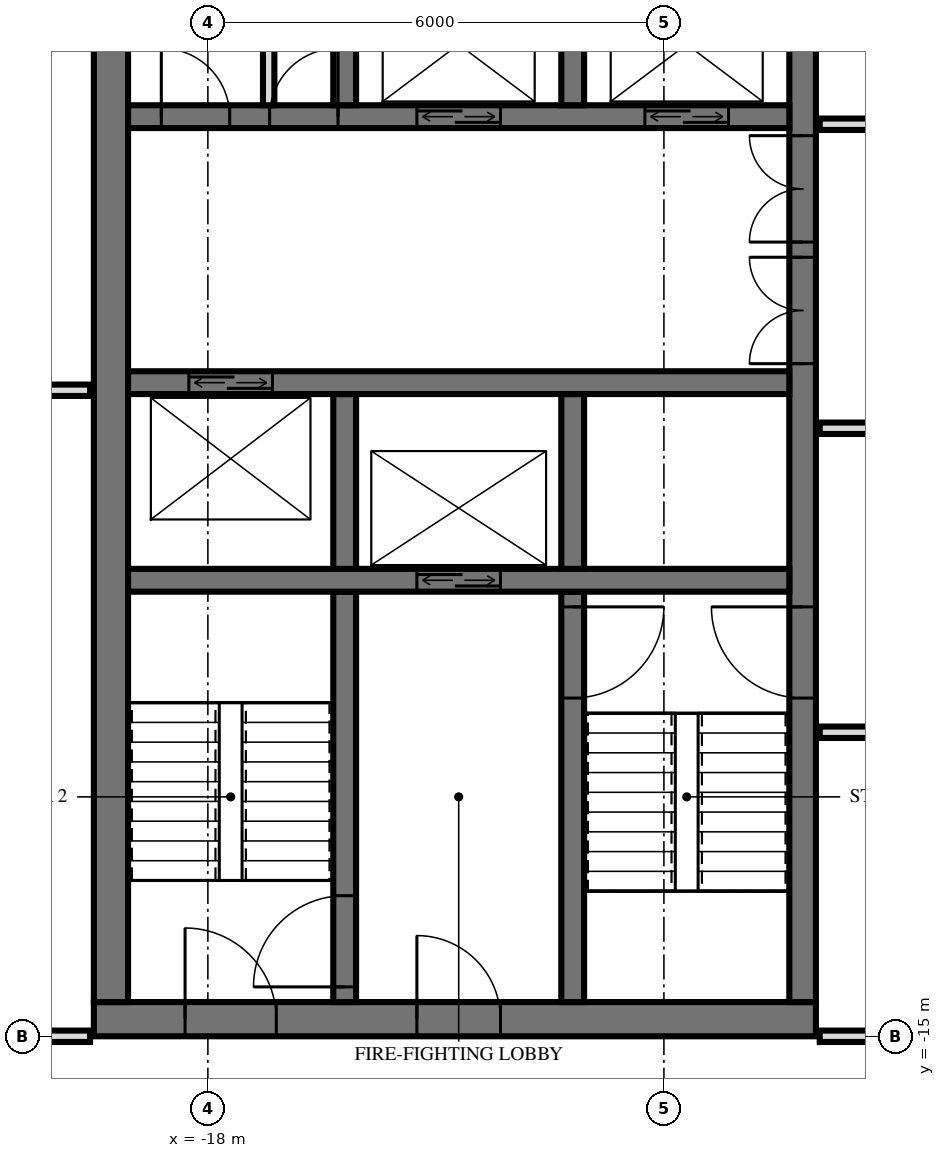
"""IFC4 building model, lengths in metres.
Left out: names, types, materials, properties, quantities, classifications, styles, units other than length and angle.
Written with IfcOpenShell. Run it as: python <this file> out.ifc"""

import sys

from ifc_helpers import new_model, si_unit, direction, frame, frame_2d, origin, place, context, subcontext, project, spatial, rectangle, extrude, element, fill, save


model = new_model("IFC4")
c1 = context("Model", 3, precision=1e-05, world=origin(), true_north=direction((0.0, 1.0)))
c2 = subcontext(c1, "Body", "Model", "MODEL_VIEW")
j1 = project(units=[si_unit("LENGTHUNIT", "METRE"), si_unit("PLANEANGLEUNIT", "RADIAN")], contexts=[c1])
p1 = place(None, origin())
s1 = spatial("IfcSite", under=j1, at=p1, CompositionType="ELEMENT")
p2 = place(p1, origin())
s2 = spatial("IfcBuilding", under=s1, at=p2, CompositionType="ELEMENT")
p3 = place(p2, frame((0.0, 0.0, 294.6)))
s3 = spatial("IfcBuildingStorey", under=s2, at=p3, CompositionType="ELEMENT", Elevation=294.6)
p4 = place(p3, frame((-19.5, -14.775, 0.0), z_axis=(0.0, 0.0, 1.0), x_axis=(1.0, 0.0, 0.0)))
e1 = element("IfcWall", 1, at=p4, inside=s3, PredefinedType="SHEAR", context=c2, shape_type="SweptSolid", body=[
    extrude(rectangle(XDim=9.5, YDim=0.45, at=frame_2d((4.75, 0.0))), origin(), (0.0, 0.0, 1.0), 3.5),
])
p5 = place(p4, frame((1.2, 0.0, 0.0)))
e2 = element("IfcOpeningElement", 2, at=p5, cuts=e1, PredefinedType="OPENING", context=c2, shape_type="SweptSolid", body=[
    extrude(rectangle(XDim=1.2, YDim=2.1, at=frame_2d((0.6, 1.05))), frame((0.0, 0.235, 0.0), z_axis=(0.0, -1.0, 0.0), x_axis=(1.0, 0.0, 0.0)), (0.0, 0.0, 1.0), 0.47),
])
p6 = place(p4, frame((4.25, 0.0, 0.0)))
e3 = element("IfcOpeningElement", 3, at=p6, cuts=e1, PredefinedType="OPENING", context=c2, shape_type="SweptSolid", body=[
    extrude(rectangle(XDim=1.1, YDim=2.1, at=frame_2d((0.55, 1.05))), frame((0.0, 0.235, 0.0), z_axis=(0.0, -1.0, 0.0), x_axis=(1.0, 0.0, 0.0)), (0.0, 0.0, 1.0), 0.47),
])
p7 = place(p3, frame((-10.175, -14.55, 0.0), z_axis=(0.0, 0.0, 1.0), x_axis=(0.0, 1.0, 0.0)))
e4 = element("IfcWall", 4, at=p7, inside=s3, PredefinedType="SHEAR", context=c2, shape_type="SweptSolid", body=[
    extrude(rectangle(XDim=14.1, YDim=0.35, at=frame_2d((7.05, 0.0))), origin(), (0.0, 0.0, 1.0), 3.5),
])
p8 = place(p7, frame((8.4, 0.0, 0.0)))
e5 = element("IfcOpeningElement", 5, at=p8, cuts=e4, PredefinedType="OPENING", context=c2, shape_type="SweptSolid", body=[
    extrude(rectangle(XDim=1.4, YDim=2.4, at=frame_2d((0.7, 1.2))), frame((0.0, 0.185, 0.0), z_axis=(0.0, -1.0, 0.0), x_axis=(1.0, 0.0, 0.0)), (0.0, 0.0, 1.0), 0.37),
])
p9 = place(p7, frame((10.0, 0.0, 0.0)))
e6 = element("IfcOpeningElement", 6, at=p9, cuts=e4, PredefinedType="OPENING", context=c2, shape_type="SweptSolid", body=[
    extrude(rectangle(XDim=1.4, YDim=2.4, at=frame_2d((0.7, 1.2))), frame((0.0, 0.185, 0.0), z_axis=(0.0, -1.0, 0.0), x_axis=(1.0, 0.0, 0.0)), (0.0, 0.0, 1.0), 0.37),
])
p10 = place(p7, frame((4.0, 0.0, 0.0)))
e7 = element("IfcOpeningElement", 7, at=p10, cuts=e4, PredefinedType="OPENING", context=c2, shape_type="SweptSolid", body=[
    extrude(rectangle(XDim=1.2, YDim=2.1, at=frame_2d((0.6, 1.05))), frame((0.0, 0.185, 0.0), z_axis=(0.0, -1.0, 0.0), x_axis=(1.0, 0.0, 0.0)), (0.0, 0.0, 1.0), 0.37),
])
p11 = place(p3, frame((-19.275, -14.55, 0.0), z_axis=(0.0, 0.0, 1.0), x_axis=(0.0, 1.0, 0.0)))
e8 = element("IfcWall", 8, at=p11, inside=s3, PredefinedType="SHEAR", context=c2, shape_type="SweptSolid", body=[
    extrude(rectangle(XDim=14.1, YDim=0.45, at=frame_2d((7.05, 0.0))), origin(), (0.0, 0.0, 1.0), 3.5),
])
p12 = place(p3, frame((-19.05, -2.9, 0.0), z_axis=(0.0, 0.0, 1.0), x_axis=(1.0, 0.0, 0.0)))
e9 = element("IfcWall", 9, at=p12, inside=s3, PredefinedType="SHEAR", context=c2, shape_type="SweptSolid", body=[
    extrude(rectangle(XDim=8.7, YDim=0.3, at=frame_2d((4.35, 0.0))), origin(), (0.0, 0.0, 1.0), 3.5),
])
p13 = place(p12, frame((6.8, 0.0, 0.0)))
e10 = element("IfcOpeningElement", 10, at=p13, cuts=e9, PredefinedType="OPENING", context=c2, shape_type="SweptSolid", body=[
    extrude(rectangle(XDim=1.1, YDim=2.1, at=frame_2d((0.55, 1.05))), frame((0.0, 0.16, 0.0), z_axis=(0.0, -1.0, 0.0), x_axis=(1.0, 0.0, 0.0)), (0.0, 0.0, 1.0), 0.32),
])
p14 = place(p12, frame((3.8, 0.0, 0.0)))
e11 = element("IfcOpeningElement", 11, at=p14, cuts=e9, PredefinedType="OPENING", context=c2, shape_type="SweptSolid", body=[
    extrude(rectangle(XDim=1.1, YDim=2.1, at=frame_2d((0.55, 1.05))), frame((0.0, 0.16, 0.0), z_axis=(0.0, -1.0, 0.0), x_axis=(1.0, 0.0, 0.0)), (0.0, 0.0, 1.0), 0.32),
])
p15 = place(p12, frame((1.863, 0.0, 0.0)))
e12 = element("IfcOpeningElement", 12, at=p15, cuts=e9, PredefinedType="OPENING", context=c2, shape_type="SweptSolid", body=[
    extrude(rectangle(XDim=0.9, YDim=2.1, at=frame_2d((0.45, 1.05))), frame((0.0, 0.16, 0.0), z_axis=(0.0, -1.0, 0.0), x_axis=(1.0, 0.0, 0.0)), (0.0, 0.0, 1.0), 0.32),
])
p16 = place(p12, frame((0.438, 0.0, 0.0)))
e13 = element("IfcOpeningElement", 13, at=p16, cuts=e9, PredefinedType="OPENING", context=c2, shape_type="SweptSolid", body=[
    extrude(rectangle(XDim=0.9, YDim=2.1, at=frame_2d((0.45, 1.05))), frame((0.0, 0.16, 0.0), z_axis=(0.0, -1.0, 0.0), x_axis=(1.0, 0.0, 0.0)), (0.0, 0.0, 1.0), 0.32),
])
p17 = place(p3, frame((-19.05, -6.4, 0.0), z_axis=(0.0, 0.0, 1.0), x_axis=(1.0, 0.0, 0.0)))
e14 = element("IfcWall", 14, at=p17, inside=s3, PredefinedType="SHEAR", context=c2, shape_type="SweptSolid", body=[
    extrude(rectangle(XDim=8.7, YDim=0.3, at=frame_2d((4.35, 0.0))), origin(), (0.0, 0.0, 1.0), 3.5),
])
p18 = place(p17, frame((0.8, 0.0, 0.0)))
e15 = element("IfcOpeningElement", 15, at=p18, cuts=e14, PredefinedType="OPENING", context=c2, shape_type="SweptSolid", body=[
    extrude(rectangle(XDim=1.1, YDim=2.1, at=frame_2d((0.55, 1.05))), frame((0.0, 0.16, 0.0), z_axis=(0.0, -1.0, 0.0), x_axis=(1.0, 0.0, 0.0)), (0.0, 0.0, 1.0), 0.32),
])
p19 = place(p3, frame((-19.05, -9.0, 0.0), z_axis=(0.0, 0.0, 1.0), x_axis=(1.0, 0.0, 0.0)))
e16 = element("IfcWall", 16, at=p19, inside=s3, PredefinedType="SHEAR", context=c2, shape_type="SweptSolid", body=[
    extrude(rectangle(XDim=8.7, YDim=0.3, at=frame_2d((4.35, 0.0))), origin(), (0.0, 0.0, 1.0), 3.5),
])
p20 = place(p19, frame((3.8, 0.0, 0.0)))
e17 = element("IfcOpeningElement", 17, at=p20, cuts=e16, PredefinedType="OPENING", context=c2, shape_type="SweptSolid", body=[
    extrude(rectangle(XDim=1.1, YDim=2.1, at=frame_2d((0.55, 1.05))), frame((0.0, 0.16, 0.0), z_axis=(0.0, -1.0, 0.0), x_axis=(1.0, 0.0, 0.0)), (0.0, 0.0, 1.0), 0.32),
])
for number, where, z_axis, x_axis in (
    (18, (-13.2, -2.75, 0.0), (0.0, 0.0, 1.0), (0.0, 1.0, 0.0)),
    (19, (-13.2, -8.85, 0.0), (0.0, 0.0, 1.0), (0.0, 1.0, 0.0)),
):
    element("IfcWall", number, at=place(p3, frame(where, z_axis=z_axis, x_axis=x_axis)), inside=s3, PredefinedType="SHEAR", context=c2, shape_type="SweptSolid", body=[
        extrude(rectangle(XDim=2.3, YDim=0.3, at=frame_2d((1.15, 0.0))), origin(), (0.0, 0.0, 1.0), 3.5),
    ])
p21 = place(p3, frame((-13.2, -14.55, 0.0), z_axis=(0.0, 0.0, 1.0), x_axis=(0.0, 1.0, 0.0)))
e20 = element("IfcWall", 20, at=p21, inside=s3, PredefinedType="SHEAR", context=c2, shape_type="SweptSolid", body=[
    extrude(rectangle(XDim=5.4, YDim=0.3, at=frame_2d((2.7, 0.0))), origin(), (0.0, 0.0, 1.0), 3.5),
])
p22 = place(p21, frame((4.0, 0.0, 0.0)))
e21 = element("IfcOpeningElement", 21, at=p22, cuts=e20, PredefinedType="OPENING", context=c2, shape_type="SweptSolid", body=[
    extrude(rectangle(XDim=1.2, YDim=2.1, at=frame_2d((0.6, 1.05))), frame((0.0, 0.16, 0.0), z_axis=(0.0, -1.0, 0.0), x_axis=(1.0, 0.0, 0.0)), (0.0, 0.0, 1.0), 0.32),
])
for number, where, z_axis, x_axis in (
    (22, (-16.2, -2.75, 0.0), (0.0, 0.0, 1.0), (0.0, 1.0, 0.0)),
    (23, (-16.2, -8.85, 0.0), (0.0, 0.0, 1.0), (0.0, 1.0, 0.0)),
):
    element("IfcWall", number, at=place(p3, frame(where, z_axis=z_axis, x_axis=x_axis)), inside=s3, PredefinedType="SHEAR", context=c2, shape_type="SweptSolid", body=[
        extrude(rectangle(XDim=2.3, YDim=0.3, at=frame_2d((1.15, 0.0))), origin(), (0.0, 0.0, 1.0), 3.5),
    ])
p23 = place(p3, frame((-16.2, -14.55, 0.0), z_axis=(0.0, 0.0, 1.0), x_axis=(0.0, 1.0, 0.0)))
e24 = element("IfcWall", 24, at=p23, inside=s3, PredefinedType="SHEAR", context=c2, shape_type="SweptSolid", body=[
    extrude(rectangle(XDim=5.4, YDim=0.3, at=frame_2d((2.7, 0.0))), origin(), (0.0, 0.0, 1.0), 3.5),
])
p24 = place(p23, frame((0.2, 0.0, 0.0)))
e25 = element("IfcOpeningElement", 25, at=p24, cuts=e24, PredefinedType="OPENING", context=c2, shape_type="SweptSolid", body=[
    extrude(rectangle(XDim=1.2, YDim=2.1, at=frame_2d((0.6, 1.05))), frame((0.0, 0.16, 0.0), z_axis=(0.0, -1.0, 0.0), x_axis=(1.0, 0.0, 0.0)), (0.0, 0.0, 1.0), 0.32),
])
p25 = place(p3, frame((-17.2, -2.75, 0.0), z_axis=(0.0, 0.0, 1.0), x_axis=(0.0, 1.0, 0.0)))
e26 = element("IfcWall", 26, at=p25, inside=s3, PredefinedType="PARTITIONING", context=c2, shape_type="SweptSolid", body=[
    extrude(rectangle(XDim=2.3, YDim=0.15, at=frame_2d((1.15, 0.0))), origin(), (0.0, 0.0, 1.0), 3.2),
])
p26 = place(p3, frame((-22.92, -15.0, 0.0), z_axis=(0.0, 0.0, 1.0), x_axis=(1.0, 0.0, 0.0)))
e27 = element("IfcWall", 27, at=p26, inside=s3, PredefinedType="PARTITIONING", context=c2, shape_type="SweptSolid", body=[
    extrude(rectangle(XDim=3.37, YDim=0.15, at=frame_2d((1.685, 0.0))), origin(), (0.0, 0.0, 1.0), 3.22),
])
p27 = place(p26, frame((1.47, 0.0, 0.0)))
e28 = element("IfcOpeningElement", 28, at=p27, cuts=e27, PredefinedType="OPENING", context=c2, shape_type="SweptSolid", body=[
    extrude(rectangle(XDim=1.0, YDim=2.1, at=frame_2d((0.5, 1.05))), frame((0.0, 0.085, 0.0), z_axis=(0.0, -1.0, 0.0), x_axis=(1.0, 0.0, 0.0)), (0.0, 0.0, 1.0), 0.17),
])
p28 = place(p3, frame((-9.95, -15.0, 0.0), z_axis=(0.0, 0.0, 1.0), x_axis=(1.0, 0.0, 0.0)))
e29 = element("IfcWall", 29, at=p28, inside=s3, PredefinedType="PARTITIONING", context=c2, shape_type="SweptSolid", body=[
    extrude(rectangle(XDim=19.9, YDim=0.15, at=frame_2d((9.95, 0.0))), origin(), (0.0, 0.0, 1.0), 2.584),
])
p29 = place(p28, frame((9.45, 0.0, 0.0)))
e30 = element("IfcOpeningElement", 30, at=p29, cuts=e29, PredefinedType="OPENING", context=c2, shape_type="SweptSolid", body=[
    extrude(rectangle(XDim=1.0, YDim=2.1, at=frame_2d((0.5, 1.05))), frame((0.0, 0.085, 0.0), z_axis=(0.0, -1.0, 0.0), x_axis=(1.0, 0.0, 0.0)), (0.0, 0.0, 1.0), 0.17),
])
p30 = place(p3, frame((-9.95, -11.0, 0.0), z_axis=(0.0, 0.0, 1.0), x_axis=(1.0, 0.0, 0.0)))
e31 = element("IfcWall", 31, at=p30, inside=s3, PredefinedType="PARTITIONING", context=c2, shape_type="SweptSolid", body=[
    extrude(rectangle(XDim=19.9, YDim=0.15, at=frame_2d((9.95, 0.0))), origin(), (0.0, 0.0, 1.0), 3.22),
])
p31 = place(p30, frame((9.45, 0.0, 0.0)))
e32 = element("IfcOpeningElement", 32, at=p31, cuts=e31, PredefinedType="OPENING", context=c2, shape_type="SweptSolid", body=[
    extrude(rectangle(XDim=1.0, YDim=2.1, at=frame_2d((0.5, 1.05))), frame((0.0, 0.085, 0.0), z_axis=(0.0, -1.0, 0.0), x_axis=(1.0, 0.0, 0.0)), (0.0, 0.0, 1.0), 0.17),
])
p32 = place(p30, frame((15.45, 0.0, 0.0)))
e33 = element("IfcOpeningElement", 33, at=p32, cuts=e31, PredefinedType="OPENING", context=c2, shape_type="SweptSolid", body=[
    extrude(rectangle(XDim=1.0, YDim=2.1, at=frame_2d((0.5, 1.05))), frame((0.0, 0.085, 0.0), z_axis=(0.0, -1.0, 0.0), x_axis=(1.0, 0.0, 0.0)), (0.0, 0.0, 1.0), 0.17),
])
p33 = place(p3, frame((-9.95, -7.0, 0.0), z_axis=(0.0, 0.0, 1.0), x_axis=(1.0, 0.0, 0.0)))
e34 = element("IfcWall", 34, at=p33, inside=s3, PredefinedType="PARTITIONING", context=c2, shape_type="SweptSolid", body=[
    extrude(rectangle(XDim=19.9, YDim=0.15, at=frame_2d((9.95, 0.0))), origin(), (0.0, 0.0, 1.0), 3.22),
])
p34 = place(p33, frame((9.45, 0.0, 0.0)))
e35 = element("IfcOpeningElement", 35, at=p34, cuts=e34, PredefinedType="OPENING", context=c2, shape_type="SweptSolid", body=[
    extrude(rectangle(XDim=1.0, YDim=2.1, at=frame_2d((0.5, 1.05))), frame((0.0, 0.085, 0.0), z_axis=(0.0, -1.0, 0.0), x_axis=(1.0, 0.0, 0.0)), (0.0, 0.0, 1.0), 0.17),
])
p35 = place(p33, frame((3.45, 0.0, 0.0)))
e36 = element("IfcOpeningElement", 36, at=p35, cuts=e34, PredefinedType="OPENING", context=c2, shape_type="SweptSolid", body=[
    extrude(rectangle(XDim=1.0, YDim=2.1, at=frame_2d((0.5, 1.05))), frame((0.0, 0.085, 0.0), z_axis=(0.0, -1.0, 0.0), x_axis=(1.0, 0.0, 0.0)), (0.0, 0.0, 1.0), 0.17),
])
p36 = place(p3, frame((-22.92, -6.5, 0.0), z_axis=(0.0, 0.0, 1.0), x_axis=(1.0, 0.0, 0.0)))
e37 = element("IfcWall", 37, at=p36, inside=s3, PredefinedType="PARTITIONING", context=c2, shape_type="SweptSolid", body=[
    extrude(rectangle(XDim=3.37, YDim=0.15, at=frame_2d((1.685, 0.0))), origin(), (0.0, 0.0, 1.0), 3.22),
])
p37 = place(p36, frame((1.17, 0.0, 0.0)))
e38 = element("IfcOpeningElement", 38, at=p37, cuts=e37, PredefinedType="OPENING", context=c2, shape_type="SweptSolid", body=[
    extrude(rectangle(XDim=0.9, YDim=2.1, at=frame_2d((0.45, 1.05))), frame((0.0, 0.085, 0.0), z_axis=(0.0, -1.0, 0.0), x_axis=(1.0, 0.0, 0.0)), (0.0, 0.0, 1.0), 0.17),
])
p38 = place(p3, frame((-9.95, -3.0, 0.0), z_axis=(0.0, 0.0, 1.0), x_axis=(1.0, 0.0, 0.0)))
e39 = element("IfcWall", 39, at=p38, inside=s3, PredefinedType="PARTITIONING", context=c2, shape_type="SweptSolid", body=[
    extrude(rectangle(XDim=19.9, YDim=0.15, at=frame_2d((9.95, 0.0))), origin(), (0.0, 0.0, 1.0), 3.22),
])
p39 = place(p38, frame((1.45, 0.0, 0.0)))
e40 = element("IfcOpeningElement", 40, at=p39, cuts=e39, PredefinedType="OPENING", context=c2, shape_type="SweptSolid", body=[
    extrude(rectangle(XDim=1.0, YDim=2.1, at=frame_2d((0.5, 1.05))), frame((0.0, 0.085, 0.0), z_axis=(0.0, -1.0, 0.0), x_axis=(1.0, 0.0, 0.0)), (0.0, 0.0, 1.0), 0.17),
])
p40 = place(p38, frame((4.95, 0.0, 0.0)))
e41 = element("IfcOpeningElement", 41, at=p40, cuts=e39, PredefinedType="OPENING", context=c2, shape_type="SweptSolid", body=[
    extrude(rectangle(XDim=1.0, YDim=2.1, at=frame_2d((0.5, 1.05))), frame((0.0, 0.085, 0.0), z_axis=(0.0, -1.0, 0.0), x_axis=(1.0, 0.0, 0.0)), (0.0, 0.0, 1.0), 0.17),
])
p41 = place(p38, frame((7.7, 0.0, 0.0)))
e42 = element("IfcOpeningElement", 42, at=p41, cuts=e39, PredefinedType="OPENING", context=c2, shape_type="SweptSolid", body=[
    extrude(rectangle(XDim=1.0, YDim=2.1, at=frame_2d((0.5, 1.05))), frame((0.0, 0.085, 0.0), z_axis=(0.0, -1.0, 0.0), x_axis=(1.0, 0.0, 0.0)), (0.0, 0.0, 1.0), 0.17),
])
p42 = place(p38, frame((14.2, 0.0, 0.0)))
e43 = element("IfcOpeningElement", 43, at=p42, cuts=e39, PredefinedType="OPENING", context=c2, shape_type="SweptSolid", body=[
    extrude(rectangle(XDim=1.0, YDim=2.1, at=frame_2d((0.5, 1.05))), frame((0.0, 0.085, 0.0), z_axis=(0.0, -1.0, 0.0), x_axis=(1.0, 0.0, 0.0)), (0.0, 0.0, 1.0), 0.17),
])
p43 = place(p13, origin())
e44 = element("IfcDoor", 44, at=p43, inside=s3, OperationType="DOUBLE_DOOR_SLIDING", PredefinedType="USERDEFINED", context=c2, shape_type="SweptSolid", body=[
    extrude(rectangle(XDim=1.1, YDim=2.1, at=frame_2d((0.55, 1.05))), frame((0.0, 0.025, 0.0), z_axis=(0.0, -1.0, 0.0), x_axis=(1.0, 0.0, 0.0)), (0.0, 0.0, 1.0), 0.05),
])
fill(e10, e44)
p44 = place(p14, origin())
e45 = element("IfcDoor", 45, at=p44, inside=s3, OperationType="DOUBLE_DOOR_SLIDING", PredefinedType="USERDEFINED", context=c2, shape_type="SweptSolid", body=[
    extrude(rectangle(XDim=1.1, YDim=2.1, at=frame_2d((0.55, 1.05))), frame((0.0, 0.025, 0.0), z_axis=(0.0, -1.0, 0.0), x_axis=(1.0, 0.0, 0.0)), (0.0, 0.0, 1.0), 0.05),
])
fill(e11, e45)
p45 = place(p20, origin())
e46 = element("IfcDoor", 46, at=p45, inside=s3, OperationType="DOUBLE_DOOR_SLIDING", PredefinedType="USERDEFINED", context=c2, shape_type="SweptSolid", body=[
    extrude(rectangle(XDim=1.1, YDim=2.1, at=frame_2d((0.55, 1.05))), frame((0.0, 0.025, 0.0), z_axis=(0.0, -1.0, 0.0), x_axis=(1.0, 0.0, 0.0)), (0.0, 0.0, 1.0), 0.05),
])
fill(e17, e46)
p46 = place(p18, origin())
e47 = element("IfcDoor", 47, at=p46, inside=s3, OperationType="DOUBLE_DOOR_SLIDING", PredefinedType="USERDEFINED", context=c2, shape_type="SweptSolid", body=[
    extrude(rectangle(XDim=1.1, YDim=2.1, at=frame_2d((0.55, 1.05))), frame((0.0, 0.025, 0.0), z_axis=(0.0, -1.0, 0.0), x_axis=(1.0, 0.0, 0.0)), (0.0, 0.0, 1.0), 0.05),
])
fill(e15, e47)
p47 = place(p8, origin())
e48 = element("IfcDoor", 48, at=p47, inside=s3, OperationType="DOUBLE_DOOR_SINGLE_SWING", PredefinedType="DOOR", context=c2, shape_type="SweptSolid", body=[
    extrude(rectangle(XDim=1.4, YDim=2.4, at=frame_2d((0.7, 1.2))), frame((0.0, 0.025, 0.0), z_axis=(0.0, -1.0, 0.0), x_axis=(1.0, 0.0, 0.0)), (0.0, 0.0, 1.0), 0.05),
])
fill(e5, e48)
p48 = place(p9, origin())
e49 = element("IfcDoor", 49, at=p48, inside=s3, OperationType="DOUBLE_DOOR_SINGLE_SWING", PredefinedType="DOOR", context=c2, shape_type="SweptSolid", body=[
    extrude(rectangle(XDim=1.4, YDim=2.4, at=frame_2d((0.7, 1.2))), frame((0.0, 0.025, 0.0), z_axis=(0.0, -1.0, 0.0), x_axis=(1.0, 0.0, 0.0)), (0.0, 0.0, 1.0), 0.05),
])
fill(e6, e49)
p49 = place(p10, origin())
e50 = element("IfcDoor", 50, at=p49, inside=s3, OperationType="SINGLE_SWING_LEFT", PredefinedType="DOOR", context=c2, shape_type="SweptSolid", body=[
    extrude(rectangle(XDim=1.2, YDim=2.1, at=frame_2d((0.6, 1.05))), frame((0.0, 0.025, 0.0), z_axis=(0.0, -1.0, 0.0), x_axis=(1.0, 0.0, 0.0)), (0.0, 0.0, 1.0), 0.05),
])
fill(e7, e50)
p50 = place(p5, origin())
e51 = element("IfcDoor", 51, at=p50, inside=s3, OperationType="SINGLE_SWING_RIGHT", PredefinedType="DOOR", context=c2, shape_type="SweptSolid", body=[
    extrude(rectangle(XDim=1.2, YDim=2.1, at=frame_2d((0.6, 1.05))), frame((0.0, 0.025, 0.0), z_axis=(0.0, -1.0, 0.0), x_axis=(1.0, 0.0, 0.0)), (0.0, 0.0, 1.0), 0.05),
])
fill(e2, e51)
p51 = place(p6, origin())
e52 = element("IfcDoor", 52, at=p51, inside=s3, OperationType="SINGLE_SWING_RIGHT", PredefinedType="DOOR", context=c2, shape_type="SweptSolid", body=[
    extrude(rectangle(XDim=1.1, YDim=2.1, at=frame_2d((0.55, 1.05))), frame((0.0, 0.025, 0.0), z_axis=(0.0, -1.0, 0.0), x_axis=(1.0, 0.0, 0.0)), (0.0, 0.0, 1.0), 0.05),
])
fill(e3, e52)
p52 = place(p15, origin())
e53 = element("IfcDoor", 53, at=p52, inside=s3, OperationType="SINGLE_SWING_LEFT", PredefinedType="DOOR", context=c2, shape_type="SweptSolid", body=[
    extrude(rectangle(XDim=0.9, YDim=2.1, at=frame_2d((0.45, 1.05))), frame((0.0, 0.025, 0.0), z_axis=(0.0, -1.0, 0.0), x_axis=(1.0, 0.0, 0.0)), (0.0, 0.0, 1.0), 0.05),
])
fill(e12, e53)
p53 = place(p16, origin())
e54 = element("IfcDoor", 54, at=p53, inside=s3, OperationType="SINGLE_SWING_RIGHT", PredefinedType="DOOR", context=c2, shape_type="SweptSolid", body=[
    extrude(rectangle(XDim=0.9, YDim=2.1, at=frame_2d((0.45, 1.05))), frame((0.0, 0.025, 0.0), z_axis=(0.0, -1.0, 0.0), x_axis=(1.0, 0.0, 0.0)), (0.0, 0.0, 1.0), 0.05),
])
fill(e13, e54)
p54 = place(p22, frame((0.6, 0.0, 0.0), z_axis=(0.0, 0.0, 1.0), x_axis=(-1.0, 0.0, 0.0)))
e55 = element("IfcDoor", 55, at=p54, inside=s3, OperationType="SINGLE_SWING_RIGHT", PredefinedType="DOOR", context=c2, shape_type="SweptSolid", body=[
    extrude(rectangle(XDim=1.2, YDim=2.1, at=frame_2d((0.0, 1.05))), frame((0.0, -0.025, 0.0), z_axis=(0.0, 1.0, 0.0), x_axis=(-1.0, 0.0, 0.0)), (0.0, 0.0, 1.0), 0.05),
])
fill(e21, e55)
p55 = place(p24, origin())
e56 = element("IfcDoor", 56, at=p55, inside=s3, OperationType="SINGLE_SWING_RIGHT", PredefinedType="DOOR", context=c2, shape_type="SweptSolid", body=[
    extrude(rectangle(XDim=1.2, YDim=2.1, at=frame_2d((0.6, 1.05))), frame((0.0, 0.025, 0.0), z_axis=(0.0, -1.0, 0.0), x_axis=(1.0, 0.0, 0.0)), (0.0, 0.0, 1.0), 0.05),
])
fill(e25, e56)
save(model, sys.argv[1])
